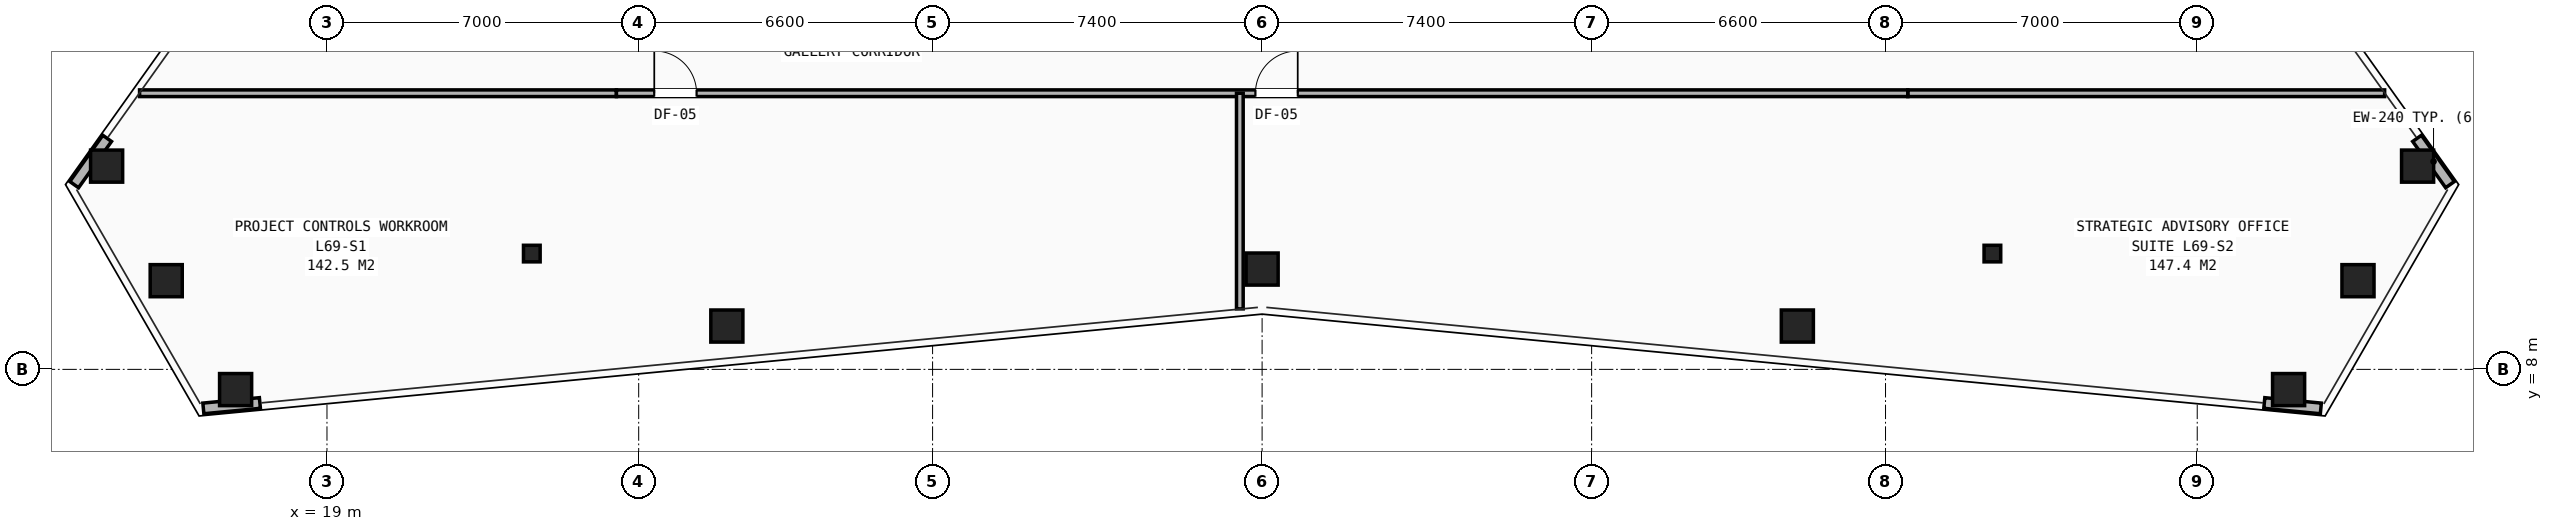
"""IFC4 building model, lengths in metres.
Left out: names, types, materials, properties, quantities, classifications, styles, units other than length and angle.
Written with IfcOpenShell. Run it as: python <this file> out.ifc"""

import sys

from ifc_helpers import new_model, si_unit, direction, frame, frame_2d, origin, origin_2d, place, context, subcontext, project, spatial, rectangle, hollow_rectangle, i_section, extrude, element, fill, save


model = new_model("IFC4")
c1 = context("Model", 3, precision=1e-05, world=origin(), true_north=direction((0.0, 1.0)))
c2 = subcontext(c1, "Body", "Model", "MODEL_VIEW")
j1 = project(units=[si_unit("LENGTHUNIT", "METRE"), si_unit("PLANEANGLEUNIT", "RADIAN")], contexts=[c1])
p1 = place(None, origin())
s1 = spatial("IfcSite", under=j1, at=p1, CompositionType="ELEMENT")
p2 = place(p1, origin())
s2 = spatial("IfcBuilding", under=s1, at=p2, CompositionType="ELEMENT")
p3 = place(p2, frame((0.0, 0.0, 243.4)))
s3 = spatial("IfcBuildingStorey", under=s2, at=p3, CompositionType="ELEMENT", Elevation=243.4)
for number, where, z_axis, x_axis in (
    (1, (23.6, 10.6, 0.0), (0.0, 0.0, 1.0), (1.0, 0.0, 0.0)),
    (2, (56.4, 10.6, 0.0), (0.0, 0.0, 1.0), (1.0, 0.0, 0.0)),
):
    element("IfcColumn", number, at=place(p3, frame(where, z_axis=z_axis, x_axis=x_axis)), inside=s3, PredefinedType="COLUMN", context=c2, shape_type="SweptSolid", body=[
        extrude(i_section(OverallWidth=0.374, OverallDepth=0.372, WebThickness=0.016, FlangeThickness=0.026, at=origin_2d()), origin(), (0.0, 0.0, 1.0), 3.5),
    ])
for number, where, z_axis, x_axis in (
    (3, (14.051, 12.564, 0.0), (0.0, 0.0, 1.0), (1.0, 0.0, 0.0)),
    (4, (15.39, 9.991, 0.0), (0.0, 0.0, 1.0), (1.0, 0.0, 0.0)),
    (5, (16.948, 7.546, 0.0), (0.0, 0.0, 1.0), (1.0, 0.0, 0.0)),
    (6, (27.98, 8.973, 0.0), (0.0, 0.0, 1.0), (1.0, 0.0, 0.0)),
    (7, (40.0, 10.252, 0.0), (0.0, 0.0, 1.0), (1.0, 0.0, 0.0)),
    (8, (52.02, 8.973, 0.0), (0.0, 0.0, 1.0), (1.0, 0.0, 0.0)),
    (9, (63.052, 7.546, 0.0), (0.0, 0.0, 1.0), (1.0, 0.0, 0.0)),
    (10, (64.61, 9.991, 0.0), (0.0, 0.0, 1.0), (1.0, 0.0, 0.0)),
    (11, (65.949, 12.564, 0.0), (0.0, 0.0, 1.0), (1.0, 0.0, 0.0)),
):
    element("IfcColumn", number, at=place(p3, frame(where, z_axis=z_axis, x_axis=x_axis)), inside=s3, PredefinedType="COLUMN", context=c2, shape_type="SweptSolid", body=[
        extrude(hollow_rectangle(XDim=0.72, YDim=0.72, WallThickness=0.05, at=origin_2d()), origin(), (0.0, 0.0, 1.0), 3.5),
    ])
p4 = place(p3, frame((14.063, 13.187, 0.0), z_axis=(0.0, 0.0, 1.0), x_axis=(-0.580314460297, -0.814392489632, 0.0)))
e12 = element("IfcWall", 12, at=p4, inside=s3, PredefinedType="SHEAR", context=c2, shape_type="SweptSolid", body=[
    extrude(rectangle(XDim=1.276, YDim=0.24, at=frame_2d((0.638, 0.0))), origin(), (0.0, 0.0, 1.0), 2.623),
])
for number, where, z_axis, x_axis in (
    (13, (16.224, 7.123, 0.0), (0.0, 0.0, 1.0), (0.995, 0.095, 0.0)),
    (14, (62.506, 7.245, 0.0), (0.0, 0.0, 1.0), (0.995, -0.095, 0.0)),
):
    element("IfcWall", number, at=place(p3, frame(where, z_axis=z_axis, x_axis=x_axis)), inside=s3, PredefinedType="SHEAR", context=c2, shape_type="SweptSolid", body=[
        extrude(rectangle(XDim=1.275, YDim=0.24, at=frame_2d((0.638, 0.0))), origin(), (0.0, 0.0, 1.0), 2.623),
    ])
p5 = place(p3, frame((66.677, 12.148, 0.0), z_axis=(0.0, 0.0, 1.0), x_axis=(-0.580314460297, 0.814392489632, 0.0)))
e15 = element("IfcWall", 15, at=p5, inside=s3, PredefinedType="SHEAR", context=c2, shape_type="SweptSolid", body=[
    extrude(rectangle(XDim=1.276, YDim=0.24, at=frame_2d((0.638, 0.0))), origin(), (0.0, 0.0, 1.0), 2.623),
])
for number, where, z_axis, x_axis in (
    (16, (14.792, 14.2, 0.0), (0.0, 0.0, 1.0), (1.0, 0.0, 0.0)),
    (17, (54.5, 14.2, 0.0), (0.0, 0.0, 1.0), (1.0, 0.0, 0.0)),
):
    element("IfcWall", number, at=place(p3, frame(where, z_axis=z_axis, x_axis=x_axis)), inside=s3, PredefinedType="PARTITIONING", context=c2, shape_type="SweptSolid", body=[
        extrude(rectangle(XDim=10.708, YDim=0.15, at=frame_2d((5.354, 0.0))), origin(), (0.0, 0.0, 1.0), 2.292),
    ])
p6 = place(p3, frame((25.5, 14.2, 0.0), z_axis=(0.0, 0.0, 1.0), x_axis=(1.0, 0.0, 0.0)))
e18 = element("IfcWall", 18, at=p6, inside=s3, PredefinedType="PARTITIONING", context=c2, shape_type="SweptSolid", body=[
    extrude(rectangle(XDim=29.0, YDim=0.15, at=frame_2d((14.5, 0.0))), origin(), (0.0, 0.0, 1.0), 2.292),
])
p7 = place(p6, frame((0.85, 0.0, 0.0)))
e19 = element("IfcOpeningElement", 19, at=p7, cuts=e18, PredefinedType="OPENING", context=c2, shape_type="SweptSolid", body=[
    extrude(rectangle(XDim=0.95, YDim=2.1, at=frame_2d((0.475, 1.05))), frame((0.0, 0.085, 0.0), z_axis=(0.0, -1.0, 0.0), x_axis=(1.0, 0.0, 0.0)), (0.0, 0.0, 1.0), 0.17),
])
p8 = place(p6, frame((14.35, 0.0, 0.0)))
e20 = element("IfcOpeningElement", 20, at=p8, cuts=e18, PredefinedType="OPENING", context=c2, shape_type="SweptSolid", body=[
    extrude(rectangle(XDim=0.95, YDim=2.1, at=frame_2d((0.475, 1.05))), frame((0.0, 0.085, 0.0), z_axis=(0.0, -1.0, 0.0), x_axis=(1.0, 0.0, 0.0)), (0.0, 0.0, 1.0), 0.17),
])
p9 = place(p3, frame((39.5, 9.358, 0.0), z_axis=(0.0, 0.0, 1.0), x_axis=(0.0, 1.0, 0.0)))
e21 = element("IfcWall", 21, at=p9, inside=s3, PredefinedType="PARTITIONING", context=c2, shape_type="SweptSolid", body=[
    extrude(rectangle(XDim=4.842, YDim=0.15, at=frame_2d((2.421, 0.0))), origin(), (0.0, 0.0, 1.0), 2.292),
])
p10 = place(p7, origin())
e22 = element("IfcDoor", 22, at=p10, inside=s3, OperationType="SINGLE_SWING_LEFT", PredefinedType="DOOR", context=c2, shape_type="SweptSolid", body=[
    extrude(rectangle(XDim=0.95, YDim=2.1, at=frame_2d((0.475, 1.05))), frame((0.0, 0.025, 0.0), z_axis=(0.0, -1.0, 0.0), x_axis=(1.0, 0.0, 0.0)), (0.0, 0.0, 1.0), 0.05),
])
fill(e19, e22)
p11 = place(p8, origin())
e23 = element("IfcDoor", 23, at=p11, inside=s3, OperationType="SINGLE_SWING_RIGHT", PredefinedType="DOOR", context=c2, shape_type="SweptSolid", body=[
    extrude(rectangle(XDim=0.95, YDim=2.1, at=frame_2d((0.475, 1.05))), frame((0.0, 0.025, 0.0), z_axis=(0.0, -1.0, 0.0), x_axis=(1.0, 0.0, 0.0)), (0.0, 0.0, 1.0), 0.05),
])
fill(e20, e23)
save(model, sys.argv[1])
